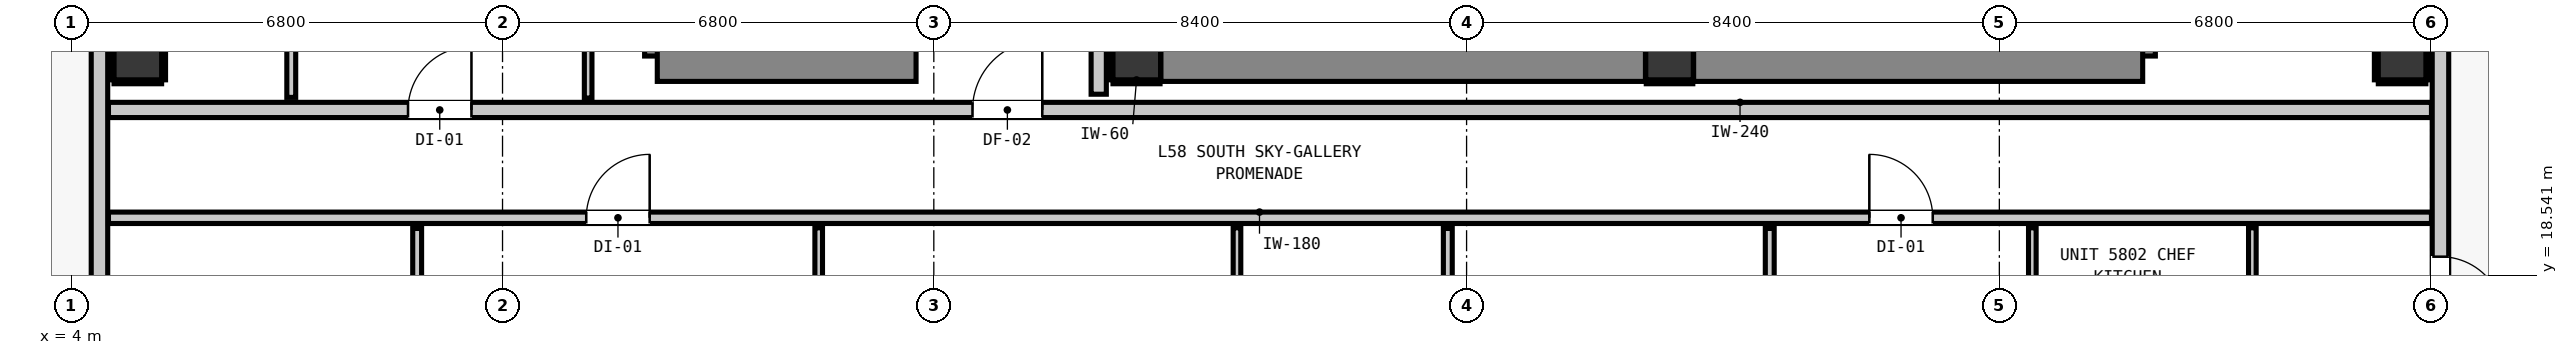
"""IFC4 building model, lengths in metres.
Left out: names, types, materials, properties, quantities, classifications, styles, units other than length and angle.
Written with IfcOpenShell. Run it as: python <this file> out.ifc"""

import sys

from ifc_helpers import new_model, si_unit, direction, frame, frame_2d, origin, origin_2d, place, context, subcontext, project, spatial, rectangle, extrude, element, fill, save


model = new_model("IFC4")
c1 = context("Model", 3, precision=1e-05, world=origin(), true_north=direction((0.0, 1.0)))
c2 = subcontext(c1, "Body", "Model", "MODEL_VIEW")
j1 = project(units=[si_unit("LENGTHUNIT", "METRE"), si_unit("PLANEANGLEUNIT", "RADIAN")], contexts=[c1])
p1 = place(None, origin())
s1 = spatial("IfcSite", under=j1, at=p1, CompositionType="ELEMENT")
p2 = place(p1, origin())
s2 = spatial("IfcBuilding", under=s1, at=p2, CompositionType="ELEMENT")
p3 = place(p2, frame((0.0, 0.0, 200.12)))
s3 = spatial("IfcBuildingStorey", under=s2, at=p3, CompositionType="ELEMENT", Elevation=200.12)
for number, where, z_axis, x_axis in (
    (1, (20.8, 22.0, 0.0), (0.0, 0.0, 1.0), (1.0, 0.0, 0.0)),
    (2, (29.2, 22.0, 0.0), (0.0, 0.0, 1.0), (1.0, 0.0, 0.0)),
):
    element("IfcColumn", number, at=place(p3, frame(where, z_axis=z_axis, x_axis=x_axis)), inside=s3, PredefinedType="COLUMN", context=c2, shape_type="SweptSolid", body=[
        extrude(rectangle(XDim=0.75, YDim=0.75, at=origin_2d()), origin(), (0.0, 0.0, 1.0), 3.32),
    ])
p4 = place(p3, frame((13.44, 22.0, 0.0), z_axis=(0.0, 0.0, 1.0), x_axis=(0.0, 1.0, 0.0)))
e3 = element("IfcWall", 3, at=p4, inside=s3, PredefinedType="SHEAR", context=c2, shape_type="SweptSolid", body=[
    extrude(rectangle(XDim=8.32, YDim=0.8, at=frame_2d((4.16, 0.0))), origin(), (0.0, 0.0, 1.0), 3.32),
])
p5 = place(p3, frame((13.24, 22.0, 0.0), z_axis=(0.0, 0.0, 1.0), x_axis=(1.0, 0.0, 0.0)))
e4 = element("IfcWall", 4, at=p5, inside=s3, PredefinedType="SHEAR", context=c2, shape_type="SweptSolid", body=[
    extrude(rectangle(XDim=4.08, YDim=0.8, at=frame_2d((2.04, 0.0))), origin(), (0.0, 0.0, 1.0), 3.32),
])
p6 = place(p3, frame((36.46, 22.0, 0.0), z_axis=(0.0, 0.0, 1.0), x_axis=(0.0, 1.0, 0.0)))
e5 = element("IfcWall", 5, at=p6, inside=s3, PredefinedType="SHEAR", context=c2, shape_type="SweptSolid", body=[
    extrude(rectangle(XDim=8.32, YDim=0.8, at=frame_2d((4.16, 0.0))), origin(), (0.0, 0.0, 1.0), 3.32),
])
p7 = place(p3, frame((29.58, 22.0, 0.0), z_axis=(0.0, 0.0, 1.0), x_axis=(1.0, 0.0, 0.0)))
e6 = element("IfcWall", 6, at=p7, inside=s3, PredefinedType="SHEAR", context=c2, shape_type="SweptSolid", body=[
    extrude(rectangle(XDim=7.08, YDim=0.8, at=frame_2d((3.54, 0.0))), origin(), (0.0, 0.0, 1.0), 3.32),
])
p8 = place(p3, frame((21.18, 22.0, 0.0), z_axis=(0.0, 0.0, 1.0), x_axis=(1.0, 0.0, 0.0)))
e7 = element("IfcWall", 7, at=p8, inside=s3, PredefinedType="SHEAR", context=c2, shape_type="SweptSolid", body=[
    extrude(rectangle(XDim=7.64, YDim=0.8, at=frame_2d((3.82, 0.0))), origin(), (0.0, 0.0, 1.0), 3.32),
])
for number, where, z_axis, x_axis in (
    (8, (5.05, 22.0, 0.0), (0.0, 0.0, 1.0), (1.0, 0.0, 0.0)),
    (9, (40.75, 22.0, 0.0), (0.0, 0.0, 1.0), (1.0, 0.0, 0.0)),
):
    element("IfcColumn", number, at=place(p3, frame(where, z_axis=z_axis, x_axis=x_axis)), inside=s3, PredefinedType="COLUMN", context=c2, shape_type="SweptSolid", body=[
        extrude(rectangle(XDim=0.75, YDim=0.75, at=origin_2d()), origin(), (0.0, 0.0, 1.0), 3.32),
    ])
p9 = place(p3, frame((4.445, 12.345, 0.0), z_axis=(0.0, 0.0, 1.0), x_axis=(0.0, 1.0, 0.0)))
e10 = element("IfcWall", 10, at=p9, inside=s3, PredefinedType="STANDARD", context=c2, shape_type="SweptSolid", body=[
    extrude(rectangle(XDim=30.31, YDim=0.26, at=frame_2d((15.155, 0.0))), origin(), (0.0, 0.0, 1.0), 3.1),
])
p10 = place(p9, frame((0.91, 0.0, 0.0)))
e11 = element("IfcOpeningElement", 11, at=p10, cuts=e10, PredefinedType="OPENING", context=c2, shape_type="SweptSolid", body=[
    extrude(rectangle(XDim=1.0, YDim=2.15, at=frame_2d((0.5, 1.075))), frame((0.0, 0.14, 0.0), z_axis=(0.0, -1.0, 0.0), x_axis=(1.0, 0.0, 0.0)), (0.0, 0.0, 1.0), 0.28),
])
p11 = place(p9, frame((2.322, 0.0, 0.85)))
e12 = element("IfcOpeningElement", 12, at=p11, cuts=e10, PredefinedType="OPENING", context=c2, shape_type="SweptSolid", body=[
    extrude(rectangle(XDim=0.58, YDim=1.5, at=frame_2d((0.29, 0.75))), frame((0.0, 0.14, 0.0), z_axis=(0.0, -1.0, 0.0), x_axis=(1.0, 0.0, 0.0)), (0.0, 0.0, 1.0), 0.28),
])
p12 = place(p9, frame((21.205, 0.0, 0.85)))
e13 = element("IfcOpeningElement", 13, at=p12, cuts=e10, PredefinedType="OPENING", context=c2, shape_type="SweptSolid", body=[
    extrude(rectangle(XDim=3.0, YDim=2.1, at=frame_2d((1.5, 1.05))), frame((0.0, 0.14, 0.0), z_axis=(0.0, -1.0, 0.0), x_axis=(1.0, 0.0, 0.0)), (0.0, 0.0, 1.0), 0.28),
])
p13 = place(p3, frame((41.355, 42.655, 0.0), z_axis=(0.0, 0.0, 1.0), x_axis=(0.0, -1.0, 0.0)))
e14 = element("IfcWall", 14, at=p13, inside=s3, PredefinedType="STANDARD", context=c2, shape_type="SweptSolid", body=[
    extrude(rectangle(XDim=30.31, YDim=0.26, at=frame_2d((15.155, 0.0))), origin(), (0.0, 0.0, 1.0), 3.1),
])
p14 = place(p13, frame((23.818, 0.0, 0.0)))
e15 = element("IfcOpeningElement", 15, at=p14, cuts=e14, PredefinedType="OPENING", context=c2, shape_type="SweptSolid", body=[
    extrude(rectangle(XDim=1.0, YDim=2.15, at=frame_2d((0.5, 1.075))), frame((0.0, 0.14, 0.0), z_axis=(0.0, -1.0, 0.0), x_axis=(1.0, 0.0, 0.0)), (0.0, 0.0, 1.0), 0.28),
])
p15 = place(p13, frame((25.482, 0.0, 0.85)))
e16 = element("IfcOpeningElement", 16, at=p15, cuts=e14, PredefinedType="OPENING", context=c2, shape_type="SweptSolid", body=[
    extrude(rectangle(XDim=1.05, YDim=1.65, at=frame_2d((0.525, 0.825))), frame((0.0, 0.14, 0.0), z_axis=(0.0, -1.0, 0.0), x_axis=(1.0, 0.0, 0.0)), (0.0, 0.0, 1.0), 0.28),
])
p16 = place(p13, frame((28.183, 0.0, 0.85)))
e17 = element("IfcOpeningElement", 17, at=p16, cuts=e14, PredefinedType="OPENING", context=c2, shape_type="SweptSolid", body=[
    extrude(rectangle(XDim=1.05, YDim=1.65, at=frame_2d((0.525, 0.825))), frame((0.0, 0.14, 0.0), z_axis=(0.0, -1.0, 0.0), x_axis=(1.0, 0.0, 0.0)), (0.0, 0.0, 1.0), 0.28),
])
p17 = place(p3, frame((4.587, 21.15, 0.0), z_axis=(0.0, 0.0, 1.0), x_axis=(1.0, 0.0, 0.0)))
e18 = element("IfcWall", 18, at=p17, inside=s3, PredefinedType="PARTITIONING", context=c2, shape_type="SweptSolid", body=[
    extrude(rectangle(XDim=36.626, YDim=0.24, at=frame_2d((18.313, 0.0))), origin(), (0.0, 0.0, 1.0), 3.1),
])
p18 = place(p17, frame((13.623, 0.0, 0.0)))
e19 = element("IfcOpeningElement", 19, at=p18, cuts=e18, PredefinedType="OPENING", context=c2, shape_type="SweptSolid", body=[
    extrude(rectangle(XDim=1.1, YDim=2.15, at=frame_2d((0.55, 1.075))), frame((0.0, 0.13, 0.0), z_axis=(0.0, -1.0, 0.0), x_axis=(1.0, 0.0, 0.0)), (0.0, 0.0, 1.0), 0.26),
])
p19 = place(p17, frame((4.723, 0.0, 0.0)))
e20 = element("IfcOpeningElement", 20, at=p19, cuts=e18, PredefinedType="OPENING", context=c2, shape_type="SweptSolid", body=[
    extrude(rectangle(XDim=1.0, YDim=2.15, at=frame_2d((0.5, 1.075))), frame((0.0, 0.13, 0.0), z_axis=(0.0, -1.0, 0.0), x_axis=(1.0, 0.0, 0.0)), (0.0, 0.0, 1.0), 0.26),
])
p20 = place(p3, frame((4.587, 19.45, 0.0), z_axis=(0.0, 0.0, 1.0), x_axis=(1.0, 0.0, 0.0)))
e21 = element("IfcWall", 21, at=p20, inside=s3, PredefinedType="PARTITIONING", context=c2, shape_type="SweptSolid", body=[
    extrude(rectangle(XDim=36.626, YDim=0.18, at=frame_2d((18.313, 0.0))), origin(), (0.0, 0.0, 1.0), 3.1),
])
p21 = place(p20, frame((7.533, 0.0, 0.0)))
e22 = element("IfcOpeningElement", 22, at=p21, cuts=e21, PredefinedType="OPENING", context=c2, shape_type="SweptSolid", body=[
    extrude(rectangle(XDim=1.0, YDim=2.15, at=frame_2d((0.5, 1.075))), frame((0.0, 0.1, 0.0), z_axis=(0.0, -1.0, 0.0), x_axis=(1.0, 0.0, 0.0)), (0.0, 0.0, 1.0), 0.2),
])
p22 = place(p20, frame((27.763, 0.0, 0.0)))
e23 = element("IfcOpeningElement", 23, at=p22, cuts=e21, PredefinedType="OPENING", context=c2, shape_type="SweptSolid", body=[
    extrude(rectangle(XDim=1.0, YDim=2.15, at=frame_2d((0.5, 1.075))), frame((0.0, 0.1, 0.0), z_axis=(0.0, -1.0, 0.0), x_axis=(1.0, 0.0, 0.0)), (0.0, 0.0, 1.0), 0.2),
])
p23 = place(p3, frame((20.2, 21.398, 0.0), z_axis=(0.0, 0.0, 1.0), x_axis=(0.0, 1.0, 0.0)))
e24 = element("IfcWall", 24, at=p23, inside=s3, PredefinedType="PARTITIONING", context=c2, shape_type="SweptSolid", body=[
    extrude(rectangle(XDim=6.754, YDim=0.24, at=frame_2d((3.377, 0.0))), origin(), (0.0, 0.0, 1.0), 3.1),
])
p24 = place(p3, frame((7.469, 21.348, 0.0), z_axis=(0.0, 0.0, 1.0), x_axis=(0.0, 1.0, 0.0)))
e25 = element("IfcWall", 25, at=p24, inside=s3, PredefinedType="PARTITIONING", context=c2, shape_type="SweptSolid", body=[
    extrude(rectangle(XDim=3.373, YDim=0.14, at=frame_2d((1.687, 0.0))), origin(), (0.0, 0.0, 1.0), 3.1),
])
p25 = place(p24, frame((1.224, 0.0, 0.0)))
e26 = element("IfcOpeningElement", 26, at=p25, cuts=e25, PredefinedType="OPENING", context=c2, shape_type="SweptSolid", body=[
    extrude(rectangle(XDim=0.9, YDim=2.1, at=frame_2d((0.45, 1.05))), frame((0.0, 0.08, 0.0), z_axis=(0.0, -1.0, 0.0), x_axis=(1.0, 0.0, 0.0)), (0.0, 0.0, 1.0), 0.16),
])
p26 = place(p3, frame((9.454, 15.707, 0.0), z_axis=(0.0, 0.0, 1.0), x_axis=(0.0, 1.0, 0.0)))
e27 = element("IfcWall", 27, at=p26, inside=s3, PredefinedType="PARTITIONING", context=c2, shape_type="SweptSolid", body=[
    extrude(rectangle(XDim=3.575, YDim=0.14, at=frame_2d((1.788, 0.0))), origin(), (0.0, 0.0, 1.0), 2.477),
])
p27 = place(p26, frame((1.355, 0.0, 0.0)))
e28 = element("IfcOpeningElement", 28, at=p27, cuts=e27, PredefinedType="OPENING", context=c2, shape_type="SweptSolid", body=[
    extrude(rectangle(XDim=0.86, YDim=2.02, at=frame_2d((0.43, 1.01))), frame((0.0, 0.08, 0.0), z_axis=(0.0, -1.0, 0.0), x_axis=(1.0, 0.0, 0.0)), (0.0, 0.0, 1.0), 0.16),
])
p28 = place(p3, frame((25.704, 15.707, 0.0), z_axis=(0.0, 0.0, 1.0), x_axis=(0.0, 1.0, 0.0)))
e29 = element("IfcWall", 29, at=p28, inside=s3, PredefinedType="PARTITIONING", context=c2, shape_type="SweptSolid", body=[
    extrude(rectangle(XDim=3.575, YDim=0.14, at=frame_2d((1.788, 0.0))), origin(), (0.0, 0.0, 1.0), 3.1),
])
p29 = place(p3, frame((30.78, 15.707, 0.0), z_axis=(0.0, 0.0, 1.0), x_axis=(0.0, 1.0, 0.0)))
e30 = element("IfcWall", 30, at=p29, inside=s3, PredefinedType="PARTITIONING", context=c2, shape_type="SweptSolid", body=[
    extrude(rectangle(XDim=3.575, YDim=0.14, at=frame_2d((1.788, 0.0))), origin(), (0.0, 0.0, 1.0), 3.1),
])
p30 = place(p29, frame((1.355, 0.0, 0.0)))
e31 = element("IfcOpeningElement", 31, at=p30, cuts=e30, PredefinedType="OPENING", context=c2, shape_type="SweptSolid", body=[
    extrude(rectangle(XDim=0.86, YDim=2.02, at=frame_2d((0.43, 1.01))), frame((0.0, 0.08, 0.0), z_axis=(0.0, -1.0, 0.0), x_axis=(1.0, 0.0, 0.0)), (0.0, 0.0, 1.0), 0.16),
])
p31 = place(p3, frame((12.15, 21.338, 0.0), z_axis=(0.0, 0.0, 1.0), x_axis=(0.0, 1.0, 0.0)))
e32 = element("IfcWall", 32, at=p31, inside=s3, PredefinedType="PARTITIONING", context=c2, shape_type="SweptSolid", body=[
    extrude(rectangle(XDim=8.324, YDim=0.12, at=frame_2d((4.162, 0.0))), origin(), (0.0, 0.0, 1.0), 3.1),
])
p32 = place(p3, frame((15.785, 15.697, 0.0), z_axis=(0.0, 0.0, 1.0), x_axis=(0.0, 1.0, 0.0)))
e33 = element("IfcWall", 33, at=p32, inside=s3, PredefinedType="PARTITIONING", context=c2, shape_type="SweptSolid", body=[
    extrude(rectangle(XDim=3.595, YDim=0.12, at=frame_2d((1.797, 0.0))), origin(), (0.0, 0.0, 1.0), 3.1),
])
p33 = place(p32, frame((1.345, 0.0, 0.0)))
e34 = element("IfcOpeningElement", 34, at=p33, cuts=e33, PredefinedType="OPENING", context=c2, shape_type="SweptSolid", body=[
    extrude(rectangle(XDim=0.9, YDim=2.1, at=frame_2d((0.45, 1.05))), frame((0.0, 0.07, 0.0), z_axis=(0.0, -1.0, 0.0), x_axis=(1.0, 0.0, 0.0)), (0.0, 0.0, 1.0), 0.14),
])
p34 = place(p3, frame((22.38, 15.697, 0.0), z_axis=(0.0, 0.0, 1.0), x_axis=(0.0, 1.0, 0.0)))
e35 = element("IfcWall", 35, at=p34, inside=s3, PredefinedType="PARTITIONING", context=c2, shape_type="SweptSolid", body=[
    extrude(rectangle(XDim=3.595, YDim=0.12, at=frame_2d((1.797, 0.0))), origin(), (0.0, 0.0, 1.0), 3.1),
])
p35 = place(p34, frame((1.358, 0.0, 0.0)))
e36 = element("IfcOpeningElement", 36, at=p35, cuts=e35, PredefinedType="OPENING", context=c2, shape_type="SweptSolid", body=[
    extrude(rectangle(XDim=0.9, YDim=2.1, at=frame_2d((0.45, 1.05))), frame((0.0, 0.07, 0.0), z_axis=(0.0, -1.0, 0.0), x_axis=(1.0, 0.0, 0.0)), (0.0, 0.0, 1.0), 0.14),
])
p36 = place(p3, frame((34.92, 15.697, 0.0), z_axis=(0.0, 0.0, 1.0), x_axis=(0.0, 1.0, 0.0)))
e37 = element("IfcWall", 37, at=p36, inside=s3, PredefinedType="PARTITIONING", context=c2, shape_type="SweptSolid", body=[
    extrude(rectangle(XDim=3.595, YDim=0.12, at=frame_2d((1.797, 0.0))), origin(), (0.0, 0.0, 1.0), 3.1),
])
p37 = place(p36, frame((1.345, 0.0, 0.0)))
e38 = element("IfcOpeningElement", 38, at=p37, cuts=e37, PredefinedType="OPENING", context=c2, shape_type="SweptSolid", body=[
    extrude(rectangle(XDim=0.9, YDim=2.1, at=frame_2d((0.45, 1.05))), frame((0.0, 0.07, 0.0), z_axis=(0.0, -1.0, 0.0), x_axis=(1.0, 0.0, 0.0)), (0.0, 0.0, 1.0), 0.14),
])
p38 = place(p3, frame((38.389, 15.697, 0.0), z_axis=(0.0, 0.0, 1.0), x_axis=(0.0, 1.0, 0.0)))
e39 = element("IfcWall", 39, at=p38, inside=s3, PredefinedType="PARTITIONING", context=c2, shape_type="SweptSolid", body=[
    extrude(rectangle(XDim=3.595, YDim=0.12, at=frame_2d((1.797, 0.0))), origin(), (0.0, 0.0, 1.0), 2.477),
])
p39 = place(p38, frame((1.358, 0.0, 0.0)))
e40 = element("IfcOpeningElement", 40, at=p39, cuts=e39, PredefinedType="OPENING", context=c2, shape_type="SweptSolid", body=[
    extrude(rectangle(XDim=0.9, YDim=2.1, at=frame_2d((0.45, 1.05))), frame((0.0, 0.07, 0.0), z_axis=(0.0, -1.0, 0.0), x_axis=(1.0, 0.0, 0.0)), (0.0, 0.0, 1.0), 0.14),
])
p40 = place(p3, frame((20.425, 21.593, 0.0), z_axis=(0.0, 0.0, 1.0), x_axis=(1.0, 0.0, 0.0)))
e41 = element("IfcWall", 41, at=p40, inside=s3, PredefinedType="PARTITIONING", context=c2, shape_type="SweptSolid", body=[
    extrude(rectangle(XDim=0.742, YDim=0.06, at=frame_2d((0.371, 0.0))), origin(), (0.0, 0.0, 1.0), 1.45),
])
p41 = place(p3, frame((20.393, 21.625, 0.0), z_axis=(0.0, 0.0, 1.0), x_axis=(0.0, 1.0, 0.0)))
e42 = element("IfcWall", 42, at=p41, inside=s3, PredefinedType="PARTITIONING", context=c2, shape_type="SweptSolid", body=[
    extrude(rectangle(XDim=0.75, YDim=0.06, at=frame_2d((0.375, 0.0))), origin(), (0.0, 0.0, 1.0), 1.45),
])
p42 = place(p3, frame((28.833, 21.593, 0.0), z_axis=(0.0, 0.0, 1.0), x_axis=(1.0, 0.0, 0.0)))
e43 = element("IfcWall", 43, at=p42, inside=s3, PredefinedType="PARTITIONING", context=c2, shape_type="SweptSolid", body=[
    extrude(rectangle(XDim=0.734, YDim=0.06, at=frame_2d((0.367, 0.0))), origin(), (0.0, 0.0, 1.0), 1.45),
])
for number, where, z_axis, x_axis in (
    (44, (4.675, 21.593, 0.0), (0.0, 0.0, 1.0), (1.0, 0.0, 0.0)),
    (45, (4.643, 21.625, 0.0), (0.0, 0.0, 1.0), (0.0, 1.0, 0.0)),
    (46, (5.457, 21.625, 0.0), (0.0, 0.0, 1.0), (0.0, 1.0, 0.0)),
    (47, (40.375, 21.593, 0.0), (0.0, 0.0, 1.0), (1.0, 0.0, 0.0)),
    (48, (40.343, 21.625, 0.0), (0.0, 0.0, 1.0), (0.0, 1.0, 0.0)),
    (49, (41.157, 21.625, 0.0), (0.0, 0.0, 1.0), (0.0, 1.0, 0.0)),
):
    element("IfcWall", number, at=place(p3, frame(where, z_axis=z_axis, x_axis=x_axis)), inside=s3, PredefinedType="PARTITIONING", context=c2, shape_type="SweptSolid", body=[
        extrude(rectangle(XDim=0.75, YDim=0.06, at=frame_2d((0.375, 0.0))), origin(), (0.0, 0.0, 1.0), 1.45),
    ])
p43 = place(p14, origin())
e50 = element("IfcDoor", 50, at=p43, inside=s3, OperationType="SINGLE_SWING_RIGHT", PredefinedType="DOOR", context=c2, shape_type="SweptSolid", body=[
    extrude(rectangle(XDim=1.0, YDim=2.15, at=frame_2d((0.5, 1.075))), frame((0.0, 0.025, 0.0), z_axis=(0.0, -1.0, 0.0), x_axis=(1.0, 0.0, 0.0)), (0.0, 0.0, 1.0), 0.05),
])
fill(e15, e50)
p44 = place(p18, origin())
e51 = element("IfcDoor", 51, at=p44, inside=s3, OperationType="SINGLE_SWING_RIGHT", PredefinedType="DOOR", context=c2, shape_type="SweptSolid", body=[
    extrude(rectangle(XDim=1.1, YDim=2.15, at=frame_2d((0.55, 1.075))), frame((0.0, 0.025, 0.0), z_axis=(0.0, -1.0, 0.0), x_axis=(1.0, 0.0, 0.0)), (0.0, 0.0, 1.0), 0.05),
])
fill(e19, e51)
p45 = place(p21, origin())
e52 = element("IfcDoor", 52, at=p45, inside=s3, OperationType="SINGLE_SWING_RIGHT", PredefinedType="DOOR", context=c2, shape_type="SweptSolid", body=[
    extrude(rectangle(XDim=1.0, YDim=2.15, at=frame_2d((0.5, 1.075))), frame((0.0, 0.025, 0.0), z_axis=(0.0, -1.0, 0.0), x_axis=(1.0, 0.0, 0.0)), (0.0, 0.0, 1.0), 0.05),
])
fill(e22, e52)
p46 = place(p22, origin())
e53 = element("IfcDoor", 53, at=p46, inside=s3, OperationType="SINGLE_SWING_LEFT", PredefinedType="DOOR", context=c2, shape_type="SweptSolid", body=[
    extrude(rectangle(XDim=1.0, YDim=2.15, at=frame_2d((0.5, 1.075))), frame((0.0, 0.025, 0.0), z_axis=(0.0, -1.0, 0.0), x_axis=(1.0, 0.0, 0.0)), (0.0, 0.0, 1.0), 0.05),
])
fill(e23, e53)
p47 = place(p19, origin())
e54 = element("IfcDoor", 54, at=p47, inside=s3, OperationType="SINGLE_SWING_RIGHT", PredefinedType="DOOR", context=c2, shape_type="SweptSolid", body=[
    extrude(rectangle(XDim=1.0, YDim=2.15, at=frame_2d((0.5, 1.075))), frame((0.0, 0.025, 0.0), z_axis=(0.0, -1.0, 0.0), x_axis=(1.0, 0.0, 0.0)), (0.0, 0.0, 1.0), 0.05),
])
fill(e20, e54)
save(model, sys.argv[1])
